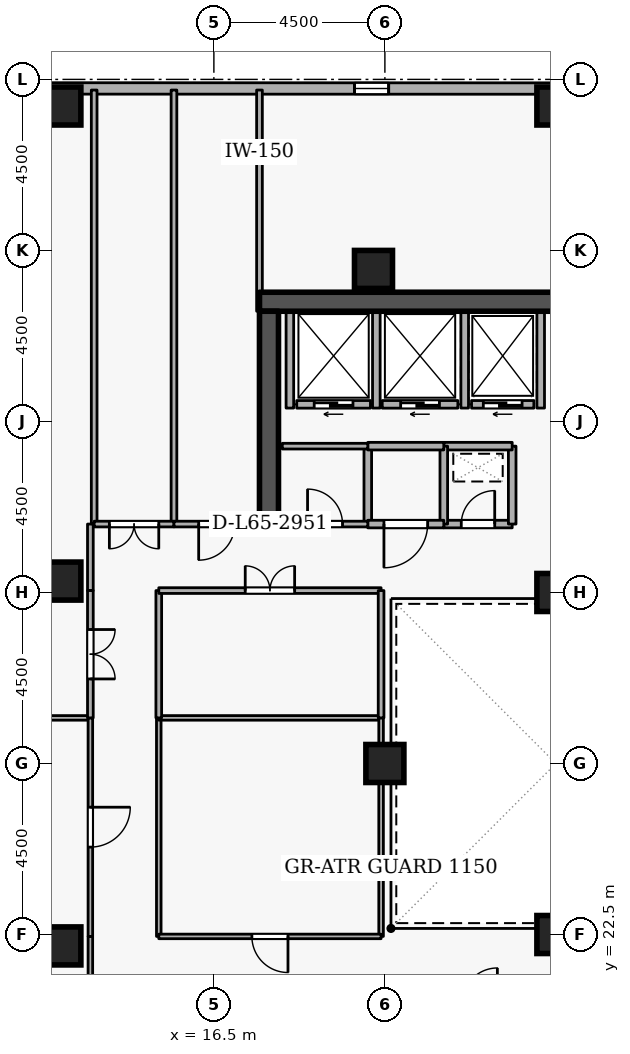
"""IFC4 building model, lengths in metres.
Left out: names, types, materials, properties, quantities, classifications, styles, units other than length and angle.
Written with IfcOpenShell. Run it as: python <this file> out.ifc"""

import sys

from ifc_helpers import new_model, si_unit, direction, frame, frame_2d, origin, origin_2d, place, context, subcontext, project, spatial, rectangle, extrude, element, fill, save


model = new_model("IFC4")
c1 = context("Model", 3, precision=1e-05, world=origin(), true_north=direction((0.0, 1.0)))
c2 = subcontext(c1, "Body", "Model", "MODEL_VIEW")
j1 = project(units=[si_unit("LENGTHUNIT", "METRE"), si_unit("PLANEANGLEUNIT", "RADIAN")], contexts=[c1])
p1 = place(None, origin())
s1 = spatial("IfcSite", under=j1, at=p1, CompositionType="ELEMENT")
p2 = place(p1, origin())
s2 = spatial("IfcBuilding", under=s1, at=p2, CompositionType="ELEMENT")
p3 = place(p2, frame((0.0, 0.0, 243.9)))
s3 = spatial("IfcBuildingStorey", under=s2, at=p3, CompositionType="ELEMENT", Elevation=243.9)
p4 = place(p3, frame((17.7, 39.15, 0.0), z_axis=(0.0, 0.0, 1.0), x_axis=(1.0, 0.0, 0.0)))
e1 = element("IfcWall", 1, at=p4, inside=s3, PredefinedType="SHEAR", context=c2, shape_type="SweptSolid", body=[
    extrude(rectangle(XDim=15.6, YDim=0.5, at=frame_2d((7.8, 0.0))), origin(), (0.0, 0.0, 1.0), 3.6),
])
p5 = place(p3, frame((17.95, 33.1, 0.0), z_axis=(0.0, 0.0, 1.0), x_axis=(0.0, 1.0, 0.0)))
e2 = element("IfcWall", 2, at=p5, inside=s3, PredefinedType="SHEAR", context=c2, shape_type="SweptSolid", body=[
    extrude(rectangle(XDim=5.8, YDim=0.5, at=frame_2d((2.9, 0.0))), origin(), (0.0, 0.0, 1.0), 3.6),
])
for number, where, z_axis, x_axis in (
    (3, (12.5, 44.3, 0.0), (0.0, 0.0, 1.0), (1.0, 0.0, 0.0)),
    (4, (25.5, 44.3, 0.0), (0.0, 0.0, 1.0), (1.0, 0.0, 0.0)),
    (5, (12.5, 22.2, 0.0), (0.0, 0.0, 1.0), (1.0, 0.0, 0.0)),
    (6, (12.5, 31.8, 0.0), (0.0, 0.0, 1.0), (1.0, 0.0, 0.0)),
    (7, (20.7, 40.0, 0.0), (0.0, 0.0, 1.0), (1.0, 0.0, 0.0)),
    (8, (25.5, 22.5, 0.0), (0.0, 0.0, 1.0), (1.0, 0.0, 0.0)),
    (9, (25.5, 31.5, 0.0), (0.0, 0.0, 1.0), (1.0, 0.0, 0.0)),
    (10, (21.0, 27.0, 0.0), (0.0, 0.0, 1.0), (1.0, 0.0, 0.0)),
):
    element("IfcColumn", number, at=place(p3, frame(where, z_axis=z_axis, x_axis=x_axis)), inside=s3, PredefinedType="COLUMN", context=c2, shape_type="SweptSolid", body=[
        extrude(rectangle(XDim=1.0, YDim=1.0, at=origin_2d()), origin(), (0.0, 0.0, 1.0), 3.6),
    ])
p6 = place(p3, frame((38.199, 44.756, 0.0), z_axis=(0.0, 0.0, 1.0), x_axis=(-0.999999969988, 0.000244999128, 0.0)))
e11 = element("IfcWall", 11, at=p6, inside=s3, PredefinedType="STANDARD", context=c2, shape_type="SweptSolid", body=[
    extrude(rectangle(XDim=33.881, YDim=0.3, at=frame_2d((16.94, 0.0))), origin(), (0.0, 0.0, 1.0), 2.7),
])
p7 = place(p6, frame((2.7, 0.0, 0.72)))
e12 = element("IfcOpeningElement", 12, at=p7, cuts=e11, PredefinedType="OPENING", context=c2, shape_type="SweptSolid", body=[
    extrude(rectangle(XDim=0.9, YDim=1.75, at=frame_2d((0.45, 0.875))), frame((0.0, 0.16, 0.0), z_axis=(0.0, -1.0, 0.0), x_axis=(1.0, 0.0, 0.0)), (0.0, 0.0, 1.0), 0.32),
])
p8 = place(p6, frame((7.5, 0.0, 0.72)))
e13 = element("IfcOpeningElement", 13, at=p8, cuts=e11, PredefinedType="OPENING", context=c2, shape_type="SweptSolid", body=[
    extrude(rectangle(XDim=0.9, YDim=1.75, at=frame_2d((0.45, 0.875))), frame((0.0, 0.16, 0.0), z_axis=(0.0, -1.0, 0.0), x_axis=(1.0, 0.0, 0.0)), (0.0, 0.0, 1.0), 0.32),
])
p9 = place(p6, frame((17.1, 0.0, 0.72)))
e14 = element("IfcOpeningElement", 14, at=p9, cuts=e11, PredefinedType="OPENING", context=c2, shape_type="SweptSolid", body=[
    extrude(rectangle(XDim=0.9, YDim=1.75, at=frame_2d((0.45, 0.875))), frame((0.0, 0.16, 0.0), z_axis=(0.0, -1.0, 0.0), x_axis=(1.0, 0.0, 0.0)), (0.0, 0.0, 1.0), 0.32),
])
p10 = place(p3, frame((24.92, 36.45, 0.0), z_axis=(0.0, 0.0, 1.0), x_axis=(-1.0, 0.0, 0.0)))
e15 = element("IfcWall", 15, at=p10, inside=s3, PredefinedType="STANDARD", context=c2, shape_type="SweptSolid", body=[
    extrude(rectangle(XDim=1.64, YDim=0.2, at=frame_2d((0.82, 0.0))), origin(), (0.0, 0.0, 1.0), 3.34),
])
p11 = place(p10, frame((0.31, 0.0, 0.0)))
e16 = element("IfcOpeningElement", 16, at=p11, cuts=e15, PredefinedType="OPENING", context=c2, shape_type="SweptSolid", body=[
    extrude(rectangle(XDim=1.02, YDim=2.06, at=frame_2d((0.51, 1.03))), frame((0.0, 0.11, 0.0), z_axis=(0.0, -1.0, 0.0), x_axis=(1.0, 0.0, 0.0)), (0.0, 0.0, 1.0), 0.22),
])
p12 = place(p3, frame((22.92, 36.45, 0.0), z_axis=(0.0, 0.0, 1.0), x_axis=(-1.0, 0.0, 0.0)))
e17 = element("IfcWall", 17, at=p12, inside=s3, PredefinedType="STANDARD", context=c2, shape_type="SweptSolid", body=[
    extrude(rectangle(XDim=1.99, YDim=0.2, at=frame_2d((0.995, 0.0))), origin(), (0.0, 0.0, 1.0), 3.34),
])
p13 = place(p12, frame((0.485, 0.0, 0.0)))
e18 = element("IfcOpeningElement", 18, at=p13, cuts=e17, PredefinedType="OPENING", context=c2, shape_type="SweptSolid", body=[
    extrude(rectangle(XDim=1.02, YDim=2.06, at=frame_2d((0.51, 1.03))), frame((0.0, 0.11, 0.0), z_axis=(0.0, -1.0, 0.0), x_axis=(1.0, 0.0, 0.0)), (0.0, 0.0, 1.0), 0.22),
])
p14 = place(p3, frame((20.62, 36.45, 0.0), z_axis=(0.0, 0.0, 1.0), x_axis=(-1.0, 0.0, 0.0)))
e19 = element("IfcWall", 19, at=p14, inside=s3, PredefinedType="STANDARD", context=c2, shape_type="SweptSolid", body=[
    extrude(rectangle(XDim=1.94, YDim=0.2, at=frame_2d((0.97, 0.0))), origin(), (0.0, 0.0, 1.0), 3.34),
])
p15 = place(p14, frame((0.46, 0.0, 0.0)))
e20 = element("IfcOpeningElement", 20, at=p15, cuts=e19, PredefinedType="OPENING", context=c2, shape_type="SweptSolid", body=[
    extrude(rectangle(XDim=1.02, YDim=2.06, at=frame_2d((0.51, 1.03))), frame((0.0, 0.11, 0.0), z_axis=(0.0, -1.0, 0.0), x_axis=(1.0, 0.0, 0.0)), (0.0, 0.0, 1.0), 0.22),
])
for number, where, z_axis, x_axis in (
    (21, (25.1, 36.352, 0.0), (0.0, 0.0, 1.0), (0.0, 1.0, 0.0)),
    (22, (23.1, 36.352, 0.0), (0.0, 0.0, 1.0), (0.0, 1.0, 0.0)),
    (23, (20.775, 36.352, 0.0), (0.0, 0.0, 1.0), (0.0, 1.0, 0.0)),
    (24, (18.5, 36.352, 0.0), (0.0, 0.0, 1.0), (0.0, 1.0, 0.0)),
):
    element("IfcWall", number, at=place(p3, frame(where, z_axis=z_axis, x_axis=x_axis)), inside=s3, PredefinedType="STANDARD", context=c2, shape_type="SweptSolid", body=[
        extrude(rectangle(XDim=2.536, YDim=0.2, at=frame_2d((1.268, 0.0))), origin(), (0.0, 0.0, 1.0), 3.34),
    ])
p16 = place(p3, frame((22.55, 33.3, 0.0), z_axis=(0.0, 0.0, 1.0), x_axis=(1.0, 0.0, 0.0)))
e25 = element("IfcWall", 25, at=p16, inside=s3, PredefinedType="STANDARD", context=c2, shape_type="SweptSolid", body=[
    extrude(rectangle(XDim=1.8, YDim=0.2, at=frame_2d((0.9, 0.0))), origin(), (0.0, 0.0, 1.0), 3.34),
])
p17 = place(p16, frame((0.46, 0.0, 0.0)))
e26 = element("IfcOpeningElement", 26, at=p17, cuts=e25, PredefinedType="OPENING", context=c2, shape_type="SweptSolid", body=[
    extrude(rectangle(XDim=0.88, YDim=2.04, at=frame_2d((0.44, 1.02))), frame((0.0, 0.11, 0.0), z_axis=(0.0, -1.0, 0.0), x_axis=(1.0, 0.0, 0.0)), (0.0, 0.0, 1.0), 0.22),
])
p18 = place(p3, frame((24.35, 33.3, 0.0), z_axis=(0.0, 0.0, 1.0), x_axis=(0.0, 1.0, 0.0)))
e27 = element("IfcWall", 27, at=p18, inside=s3, PredefinedType="STANDARD", context=c2, shape_type="SweptSolid", body=[
    extrude(rectangle(XDim=2.05, YDim=0.2, at=frame_2d((1.025, 0.0))), origin(), (0.0, 0.0, 1.0), 3.34),
])
p19 = place(p3, frame((24.35, 35.35, 0.0), z_axis=(0.0, 0.0, 1.0), x_axis=(-1.0, 0.0, 0.0)))
e28 = element("IfcWall", 28, at=p19, inside=s3, PredefinedType="STANDARD", context=c2, shape_type="SweptSolid", body=[
    extrude(rectangle(XDim=1.8, YDim=0.2, at=frame_2d((0.9, 0.0))), origin(), (0.0, 0.0, 1.0), 3.34),
])
for number, where, z_axis, x_axis in (
    (29, (22.55, 35.35, 0.0), (0.0, 0.0, 1.0), (0.0, -1.0, 0.0)),
    (30, (20.55, 33.3, 0.0), (0.0, 0.0, 1.0), (0.0, 1.0, 0.0)),
):
    element("IfcWall", number, at=place(p3, frame(where, z_axis=z_axis, x_axis=x_axis)), inside=s3, PredefinedType="STANDARD", context=c2, shape_type="SweptSolid", body=[
        extrude(rectangle(XDim=2.05, YDim=0.2, at=frame_2d((1.025, 0.0))), origin(), (0.0, 0.0, 1.0), 3.34),
    ])
p20 = place(p3, frame((20.55, 35.35, 0.0), z_axis=(0.0, 0.0, 1.0), x_axis=(1.0, 0.0, 0.0)))
e31 = element("IfcWall", 31, at=p20, inside=s3, PredefinedType="STANDARD", context=c2, shape_type="SweptSolid", body=[
    extrude(rectangle(XDim=2.0, YDim=0.2, at=frame_2d((1.0, 0.0))), origin(), (0.0, 0.0, 1.0), 3.34),
])
p21 = place(p3, frame((22.55, 33.3, 0.0), z_axis=(0.0, 0.0, 1.0), x_axis=(-1.0, 0.0, 0.0)))
e32 = element("IfcWall", 32, at=p21, inside=s3, PredefinedType="STANDARD", context=c2, shape_type="SweptSolid", body=[
    extrude(rectangle(XDim=2.0, YDim=0.2, at=frame_2d((1.0, 0.0))), origin(), (0.0, 0.0, 1.0), 3.34),
])
p22 = place(p21, frame((0.425, 0.0, 0.0)))
e33 = element("IfcOpeningElement", 33, at=p22, cuts=e32, PredefinedType="OPENING", context=c2, shape_type="SweptSolid", body=[
    extrude(rectangle(XDim=1.15, YDim=2.1, at=frame_2d((0.575, 1.05))), frame((0.0, 0.11, 0.0), z_axis=(0.0, -1.0, 0.0), x_axis=(1.0, 0.0, 0.0)), (0.0, 0.0, 1.0), 0.22),
])
p23 = place(p3, frame((18.3, 33.3, 0.0), z_axis=(0.0, 0.0, 1.0), x_axis=(1.0, 0.0, 0.0)))
e34 = element("IfcWall", 34, at=p23, inside=s3, PredefinedType="PARTITIONING", context=c2, shape_type="SweptSolid", body=[
    extrude(rectangle(XDim=2.25, YDim=0.15, at=frame_2d((1.125, 0.0))), origin(), (0.0, 0.0, 1.0), 3.34),
])
p24 = place(p23, frame((0.665, 0.0, 0.0)))
e35 = element("IfcOpeningElement", 35, at=p24, cuts=e34, PredefinedType="OPENING", context=c2, shape_type="SweptSolid", body=[
    extrude(rectangle(XDim=0.92, YDim=2.08, at=frame_2d((0.46, 1.04))), frame((0.0, 0.085, 0.0), z_axis=(0.0, -1.0, 0.0), x_axis=(1.0, 0.0, 0.0)), (0.0, 0.0, 1.0), 0.17),
])
p25 = place(p3, frame((20.55, 35.35, 0.0), z_axis=(0.0, 0.0, 1.0), x_axis=(-1.0, 0.0, 0.0)))
e36 = element("IfcWall", 36, at=p25, inside=s3, PredefinedType="PARTITIONING", context=c2, shape_type="SweptSolid", body=[
    extrude(rectangle(XDim=2.25, YDim=0.15, at=frame_2d((1.125, 0.0))), origin(), (0.0, 0.0, 1.0), 3.34),
])
for number, where, z_axis, x_axis in (
    (37, (13.35, 33.3, 0.0), (0.0, 0.0, 1.0), (0.0, 1.0, 0.0)),
    (38, (15.45, 44.72, 0.0), (0.0, 0.0, 1.0), (0.0, -1.0, 0.0)),
):
    element("IfcWall", number, at=place(p3, frame(where, z_axis=z_axis, x_axis=x_axis)), inside=s3, PredefinedType="PARTITIONING", context=c2, shape_type="SweptSolid", body=[
        extrude(rectangle(XDim=11.42, YDim=0.15, at=frame_2d((5.71, 0.0))), origin(), (0.0, 0.0, 1.0), 3.34),
    ])
p26 = place(p3, frame((15.45, 33.3, 0.0), z_axis=(0.0, 0.0, 1.0), x_axis=(-1.0, 0.0, 0.0)))
e39 = element("IfcWall", 39, at=p26, inside=s3, PredefinedType="PARTITIONING", context=c2, shape_type="SweptSolid", body=[
    extrude(rectangle(XDim=2.1, YDim=0.15, at=frame_2d((1.05, 0.0))), origin(), (0.0, 0.0, 1.0), 3.34),
])
p27 = place(p26, frame((0.4, 0.0, 0.0)))
e40 = element("IfcOpeningElement", 40, at=p27, cuts=e39, PredefinedType="OPENING", context=c2, shape_type="SweptSolid", body=[
    extrude(rectangle(XDim=1.3, YDim=2.12, at=frame_2d((0.65, 1.06))), frame((0.0, 0.085, 0.0), z_axis=(0.0, -1.0, 0.0), x_axis=(1.0, 0.0, 0.0)), (0.0, 0.0, 1.0), 0.17),
])
p28 = place(p3, frame((17.7, 44.72, 0.0), z_axis=(0.0, 0.0, 1.0), x_axis=(0.0, -1.0, 0.0)))
e41 = element("IfcWall", 41, at=p28, inside=s3, PredefinedType="PARTITIONING", context=c2, shape_type="SweptSolid", body=[
    extrude(rectangle(XDim=5.82, YDim=0.15, at=frame_2d((2.91, 0.0))), origin(), (0.0, 0.0, 1.0), 2.545),
])
p29 = place(p3, frame((17.7, 33.3, 0.0), z_axis=(0.0, 0.0, 1.0), x_axis=(-1.0, 0.0, 0.0)))
e42 = element("IfcWall", 42, at=p29, inside=s3, PredefinedType="PARTITIONING", context=c2, shape_type="SweptSolid", body=[
    extrude(rectangle(XDim=2.25, YDim=0.15, at=frame_2d((1.125, 0.0))), origin(), (0.0, 0.0, 1.0), 3.34),
])
p30 = place(p29, frame((0.65, 0.0, 0.0)))
e43 = element("IfcOpeningElement", 43, at=p30, cuts=e42, PredefinedType="OPENING", context=c2, shape_type="SweptSolid", body=[
    extrude(rectangle(XDim=0.95, YDim=2.1, at=frame_2d((0.475, 1.05))), frame((0.0, 0.085, 0.0), z_axis=(0.0, -1.0, 0.0), x_axis=(1.0, 0.0, 0.0)), (0.0, 0.0, 1.0), 0.17),
])
p31 = place(p3, frame((13.25, 22.45, 0.0), z_axis=(0.0, 0.0, 1.0), x_axis=(0.0, -1.0, 0.0)))
e44 = element("IfcWall", 44, at=p31, inside=s3, PredefinedType="PARTITIONING", context=c2, shape_type="SweptSolid", body=[
    extrude(rectangle(XDim=1.75, YDim=0.12, at=frame_2d((0.875, 0.0))), origin(), (0.0, 0.0, 1.0), 3.34),
])
p32 = place(p3, frame((1.78, 28.2, 0.0), z_axis=(0.0, 0.0, 1.0), x_axis=(1.0, 0.0, 0.0)))
e45 = element("IfcWall", 45, at=p32, inside=s3, PredefinedType="PARTITIONING", context=c2, shape_type="SweptSolid", body=[
    extrude(rectangle(XDim=11.47, YDim=0.12, at=frame_2d((5.735, 0.0))), origin(), (0.0, 0.0, 1.0), 3.34),
])
p33 = place(p3, frame((13.25, 28.2, 0.0), z_axis=(0.0, 0.0, 1.0), x_axis=(0.0, -1.0, 0.0)))
e46 = element("IfcWall", 46, at=p33, inside=s3, PredefinedType="PARTITIONING", context=c2, shape_type="SweptSolid", body=[
    extrude(rectangle(XDim=5.75, YDim=0.12, at=frame_2d((2.875, 0.0))), origin(), (0.0, 0.0, 1.0), 3.34),
])
p34 = place(p33, frame((2.35, 0.0, 0.0)))
e47 = element("IfcOpeningElement", 47, at=p34, cuts=e46, PredefinedType="OPENING", context=c2, shape_type="SweptSolid", body=[
    extrude(rectangle(XDim=1.05, YDim=2.1, at=frame_2d((0.525, 1.05))), frame((0.0, 0.07, 0.0), z_axis=(0.0, -1.0, 0.0), x_axis=(1.0, 0.0, 0.0)), (0.0, 0.0, 1.0), 0.14),
])
p35 = place(p3, frame((13.25, 33.3, 0.0), z_axis=(0.0, 0.0, 1.0), x_axis=(0.0, -1.0, 0.0)))
e48 = element("IfcWall", 48, at=p35, inside=s3, PredefinedType="PARTITIONING", context=c2, shape_type="SweptSolid", body=[
    extrude(rectangle(XDim=1.75, YDim=0.15, at=frame_2d((0.875, 0.0))), origin(), (0.0, 0.0, 1.0), 3.34),
])
p36 = place(p3, frame((13.25, 31.55, 0.0), z_axis=(0.0, 0.0, 1.0), x_axis=(0.0, -1.0, 0.0)))
e49 = element("IfcWall", 49, at=p36, inside=s3, PredefinedType="PARTITIONING", context=c2, shape_type="SweptSolid", body=[
    extrude(rectangle(XDim=3.35, YDim=0.15, at=frame_2d((1.675, 0.0))), origin(), (0.0, 0.0, 1.0), 3.34),
])
p37 = place(p36, frame((1.025, 0.0, 0.0)))
e50 = element("IfcOpeningElement", 50, at=p37, cuts=e49, PredefinedType="OPENING", context=c2, shape_type="SweptSolid", body=[
    extrude(rectangle(XDim=1.3, YDim=2.12, at=frame_2d((0.65, 1.06))), frame((0.0, 0.085, 0.0), z_axis=(0.0, -1.0, 0.0), x_axis=(1.0, 0.0, 0.0)), (0.0, 0.0, 1.0), 0.17),
])
p38 = place(p3, frame((15.05, 22.45, 0.0), z_axis=(0.0, 0.0, 1.0), x_axis=(0.0, 1.0, 0.0)))
e51 = element("IfcWall", 51, at=p38, inside=s3, PredefinedType="PARTITIONING", context=c2, shape_type="SweptSolid", body=[
    extrude(rectangle(XDim=5.75, YDim=0.12, at=frame_2d((2.875, 0.0))), origin(), (0.0, 0.0, 1.0), 3.34),
])
p39 = place(p3, frame((15.05, 28.2, 0.0), z_axis=(0.0, 0.0, 1.0), x_axis=(1.0, 0.0, 0.0)))
e52 = element("IfcWall", 52, at=p39, inside=s3, PredefinedType="PARTITIONING", context=c2, shape_type="SweptSolid", body=[
    extrude(rectangle(XDim=5.85, YDim=0.12, at=frame_2d((2.925, 0.0))), origin(), (0.0, 0.0, 1.0), 3.34),
])
p40 = place(p3, frame((20.9, 28.2, 0.0), z_axis=(0.0, 0.0, 1.0), x_axis=(0.0, -1.0, 0.0)))
e53 = element("IfcWall", 53, at=p40, inside=s3, PredefinedType="PARTITIONING", context=c2, shape_type="SweptSolid", body=[
    extrude(rectangle(XDim=5.75, YDim=0.12, at=frame_2d((2.875, 0.0))), origin(), (0.0, 0.0, 1.0), 3.34),
])
p41 = place(p3, frame((20.9, 22.45, 0.0), z_axis=(0.0, 0.0, 1.0), x_axis=(-1.0, 0.0, 0.0)))
e54 = element("IfcWall", 54, at=p41, inside=s3, PredefinedType="PARTITIONING", context=c2, shape_type="SweptSolid", body=[
    extrude(rectangle(XDim=5.85, YDim=0.12, at=frame_2d((2.925, 0.0))), origin(), (0.0, 0.0, 1.0), 3.34),
])
p42 = place(p41, frame((2.45, 0.0, 0.0)))
e55 = element("IfcOpeningElement", 55, at=p42, cuts=e54, PredefinedType="OPENING", context=c2, shape_type="SweptSolid", body=[
    extrude(rectangle(XDim=0.95, YDim=2.1, at=frame_2d((0.475, 1.05))), frame((0.0, 0.07, 0.0), z_axis=(0.0, -1.0, 0.0), x_axis=(1.0, 0.0, 0.0)), (0.0, 0.0, 1.0), 0.14),
])
p43 = place(p3, frame((15.05, 28.2, 0.0), z_axis=(0.0, 0.0, 1.0), x_axis=(0.0, 1.0, 0.0)))
e56 = element("IfcWall", 56, at=p43, inside=s3, PredefinedType="PARTITIONING", context=c2, shape_type="SweptSolid", body=[
    extrude(rectangle(XDim=3.35, YDim=0.15, at=frame_2d((1.675, 0.0))), origin(), (0.0, 0.0, 1.0), 3.34),
])
p44 = place(p3, frame((15.05, 31.55, 0.0), z_axis=(0.0, 0.0, 1.0), x_axis=(1.0, 0.0, 0.0)))
e57 = element("IfcWall", 57, at=p44, inside=s3, PredefinedType="PARTITIONING", context=c2, shape_type="SweptSolid", body=[
    extrude(rectangle(XDim=5.85, YDim=0.15, at=frame_2d((2.925, 0.0))), origin(), (0.0, 0.0, 1.0), 3.34),
])
p45 = place(p44, frame((2.275, 0.0, 0.0)))
e58 = element("IfcOpeningElement", 58, at=p45, cuts=e57, PredefinedType="OPENING", context=c2, shape_type="SweptSolid", body=[
    extrude(rectangle(XDim=1.3, YDim=2.12, at=frame_2d((0.65, 1.06))), frame((0.0, 0.085, 0.0), z_axis=(0.0, -1.0, 0.0), x_axis=(1.0, 0.0, 0.0)), (0.0, 0.0, 1.0), 0.17),
])
p46 = place(p3, frame((20.9, 31.55, 0.0), z_axis=(0.0, 0.0, 1.0), x_axis=(0.0, -1.0, 0.0)))
e59 = element("IfcWall", 59, at=p46, inside=s3, PredefinedType="PARTITIONING", context=c2, shape_type="SweptSolid", body=[
    extrude(rectangle(XDim=3.35, YDim=0.15, at=frame_2d((1.675, 0.0))), origin(), (0.0, 0.0, 1.0), 3.34),
])
p47 = place(p9, origin())
e60 = element("IfcWindow", 60, at=p47, inside=s3, PartitioningType="SINGLE_PANEL", PredefinedType="WINDOW", context=c2, shape_type="SweptSolid", body=[
    extrude(rectangle(XDim=0.9, YDim=1.75, at=frame_2d((0.45, 0.875))), frame((0.0, 0.03, 0.0), z_axis=(0.0, -1.0, 0.0), x_axis=(1.0, 0.0, 0.0)), (0.0, 0.0, 1.0), 0.06),
])
fill(e14, e60)
p48 = place(p11, origin())
e61 = element("IfcDoor", 61, at=p48, inside=s3, OperationType="SLIDING_TO_LEFT", PredefinedType="DOOR", context=c2, shape_type="SweptSolid", body=[
    extrude(rectangle(XDim=1.02, YDim=2.06, at=frame_2d((0.51, 1.03))), frame((0.0, 0.025, 0.0), z_axis=(0.0, -1.0, 0.0), x_axis=(1.0, 0.0, 0.0)), (0.0, 0.0, 1.0), 0.05),
])
fill(e16, e61)
p49 = place(p13, origin())
e62 = element("IfcDoor", 62, at=p49, inside=s3, OperationType="SLIDING_TO_LEFT", PredefinedType="DOOR", context=c2, shape_type="SweptSolid", body=[
    extrude(rectangle(XDim=1.02, YDim=2.06, at=frame_2d((0.51, 1.03))), frame((0.0, 0.025, 0.0), z_axis=(0.0, -1.0, 0.0), x_axis=(1.0, 0.0, 0.0)), (0.0, 0.0, 1.0), 0.05),
])
fill(e18, e62)
p50 = place(p15, origin())
e63 = element("IfcDoor", 63, at=p50, inside=s3, OperationType="SLIDING_TO_LEFT", PredefinedType="DOOR", context=c2, shape_type="SweptSolid", body=[
    extrude(rectangle(XDim=1.02, YDim=2.06, at=frame_2d((0.51, 1.03))), frame((0.0, 0.025, 0.0), z_axis=(0.0, -1.0, 0.0), x_axis=(1.0, 0.0, 0.0)), (0.0, 0.0, 1.0), 0.05),
])
fill(e20, e63)
p51 = place(p17, origin())
e64 = element("IfcDoor", 64, at=p51, inside=s3, OperationType="SINGLE_SWING_RIGHT", PredefinedType="DOOR", context=c2, shape_type="SweptSolid", body=[
    extrude(rectangle(XDim=0.88, YDim=2.04, at=frame_2d((0.44, 1.02))), frame((0.0, 0.025, 0.0), z_axis=(0.0, -1.0, 0.0), x_axis=(1.0, 0.0, 0.0)), (0.0, 0.0, 1.0), 0.05),
])
fill(e26, e64)
p52 = place(p24, origin())
e65 = element("IfcDoor", 65, at=p52, inside=s3, OperationType="SINGLE_SWING_LEFT", PredefinedType="DOOR", context=c2, shape_type="SweptSolid", body=[
    extrude(rectangle(XDim=0.92, YDim=2.08, at=frame_2d((0.46, 1.04))), frame((0.0, 0.025, 0.0), z_axis=(0.0, -1.0, 0.0), x_axis=(1.0, 0.0, 0.0)), (0.0, 0.0, 1.0), 0.05),
])
fill(e35, e65)
p53 = place(p22, origin())
e66 = element("IfcDoor", 66, at=p53, inside=s3, OperationType="SINGLE_SWING_RIGHT", PredefinedType="DOOR", context=c2, shape_type="SweptSolid", body=[
    extrude(rectangle(XDim=1.15, YDim=2.1, at=frame_2d((0.575, 1.05))), frame((0.0, 0.025, 0.0), z_axis=(0.0, -1.0, 0.0), x_axis=(1.0, 0.0, 0.0)), (0.0, 0.0, 1.0), 0.05),
])
fill(e33, e66)
p54 = place(p27, origin())
e67 = element("IfcDoor", 67, at=p54, inside=s3, OperationType="DOUBLE_DOOR_SINGLE_SWING", PredefinedType="DOOR", context=c2, shape_type="SweptSolid", body=[
    extrude(rectangle(XDim=1.3, YDim=2.12, at=frame_2d((0.65, 1.06))), frame((0.0, 0.025, 0.0), z_axis=(0.0, -1.0, 0.0), x_axis=(1.0, 0.0, 0.0)), (0.0, 0.0, 1.0), 0.05),
])
fill(e40, e67)
p55 = place(p30, origin())
e68 = element("IfcDoor", 68, at=p55, inside=s3, OperationType="SINGLE_SWING_RIGHT", PredefinedType="DOOR", context=c2, shape_type="SweptSolid", body=[
    extrude(rectangle(XDim=0.95, YDim=2.1, at=frame_2d((0.475, 1.05))), frame((0.0, 0.025, 0.0), z_axis=(0.0, -1.0, 0.0), x_axis=(1.0, 0.0, 0.0)), (0.0, 0.0, 1.0), 0.05),
])
fill(e43, e68)
p56 = place(p34, origin())
e69 = element("IfcDoor", 69, at=p56, inside=s3, OperationType="SINGLE_SWING_LEFT", PredefinedType="DOOR", context=c2, shape_type="SweptSolid", body=[
    extrude(rectangle(XDim=1.05, YDim=2.1, at=frame_2d((0.525, 1.05))), frame((0.0, 0.025, 0.0), z_axis=(0.0, -1.0, 0.0), x_axis=(1.0, 0.0, 0.0)), (0.0, 0.0, 1.0), 0.05),
])
fill(e47, e69)
p57 = place(p37, origin())
e70 = element("IfcDoor", 70, at=p57, inside=s3, OperationType="DOUBLE_DOOR_SINGLE_SWING", PredefinedType="DOOR", context=c2, shape_type="SweptSolid", body=[
    extrude(rectangle(XDim=1.3, YDim=2.12, at=frame_2d((0.65, 1.06))), frame((0.0, 0.025, 0.0), z_axis=(0.0, -1.0, 0.0), x_axis=(1.0, 0.0, 0.0)), (0.0, 0.0, 1.0), 0.05),
])
fill(e50, e70)
p58 = place(p42, origin())
e71 = element("IfcDoor", 71, at=p58, inside=s3, OperationType="SINGLE_SWING_LEFT", PredefinedType="DOOR", context=c2, shape_type="SweptSolid", body=[
    extrude(rectangle(XDim=0.95, YDim=2.1, at=frame_2d((0.475, 1.05))), frame((0.0, 0.025, 0.0), z_axis=(0.0, -1.0, 0.0), x_axis=(1.0, 0.0, 0.0)), (0.0, 0.0, 1.0), 0.05),
])
fill(e55, e71)
p59 = place(p45, origin())
e72 = element("IfcDoor", 72, at=p59, inside=s3, OperationType="DOUBLE_DOOR_SINGLE_SWING", PredefinedType="DOOR", context=c2, shape_type="SweptSolid", body=[
    extrude(rectangle(XDim=1.3, YDim=2.12, at=frame_2d((0.65, 1.06))), frame((0.0, 0.025, 0.0), z_axis=(0.0, -1.0, 0.0), x_axis=(1.0, 0.0, 0.0)), (0.0, 0.0, 1.0), 0.05),
])
fill(e58, e72)
save(model, sys.argv[1])
